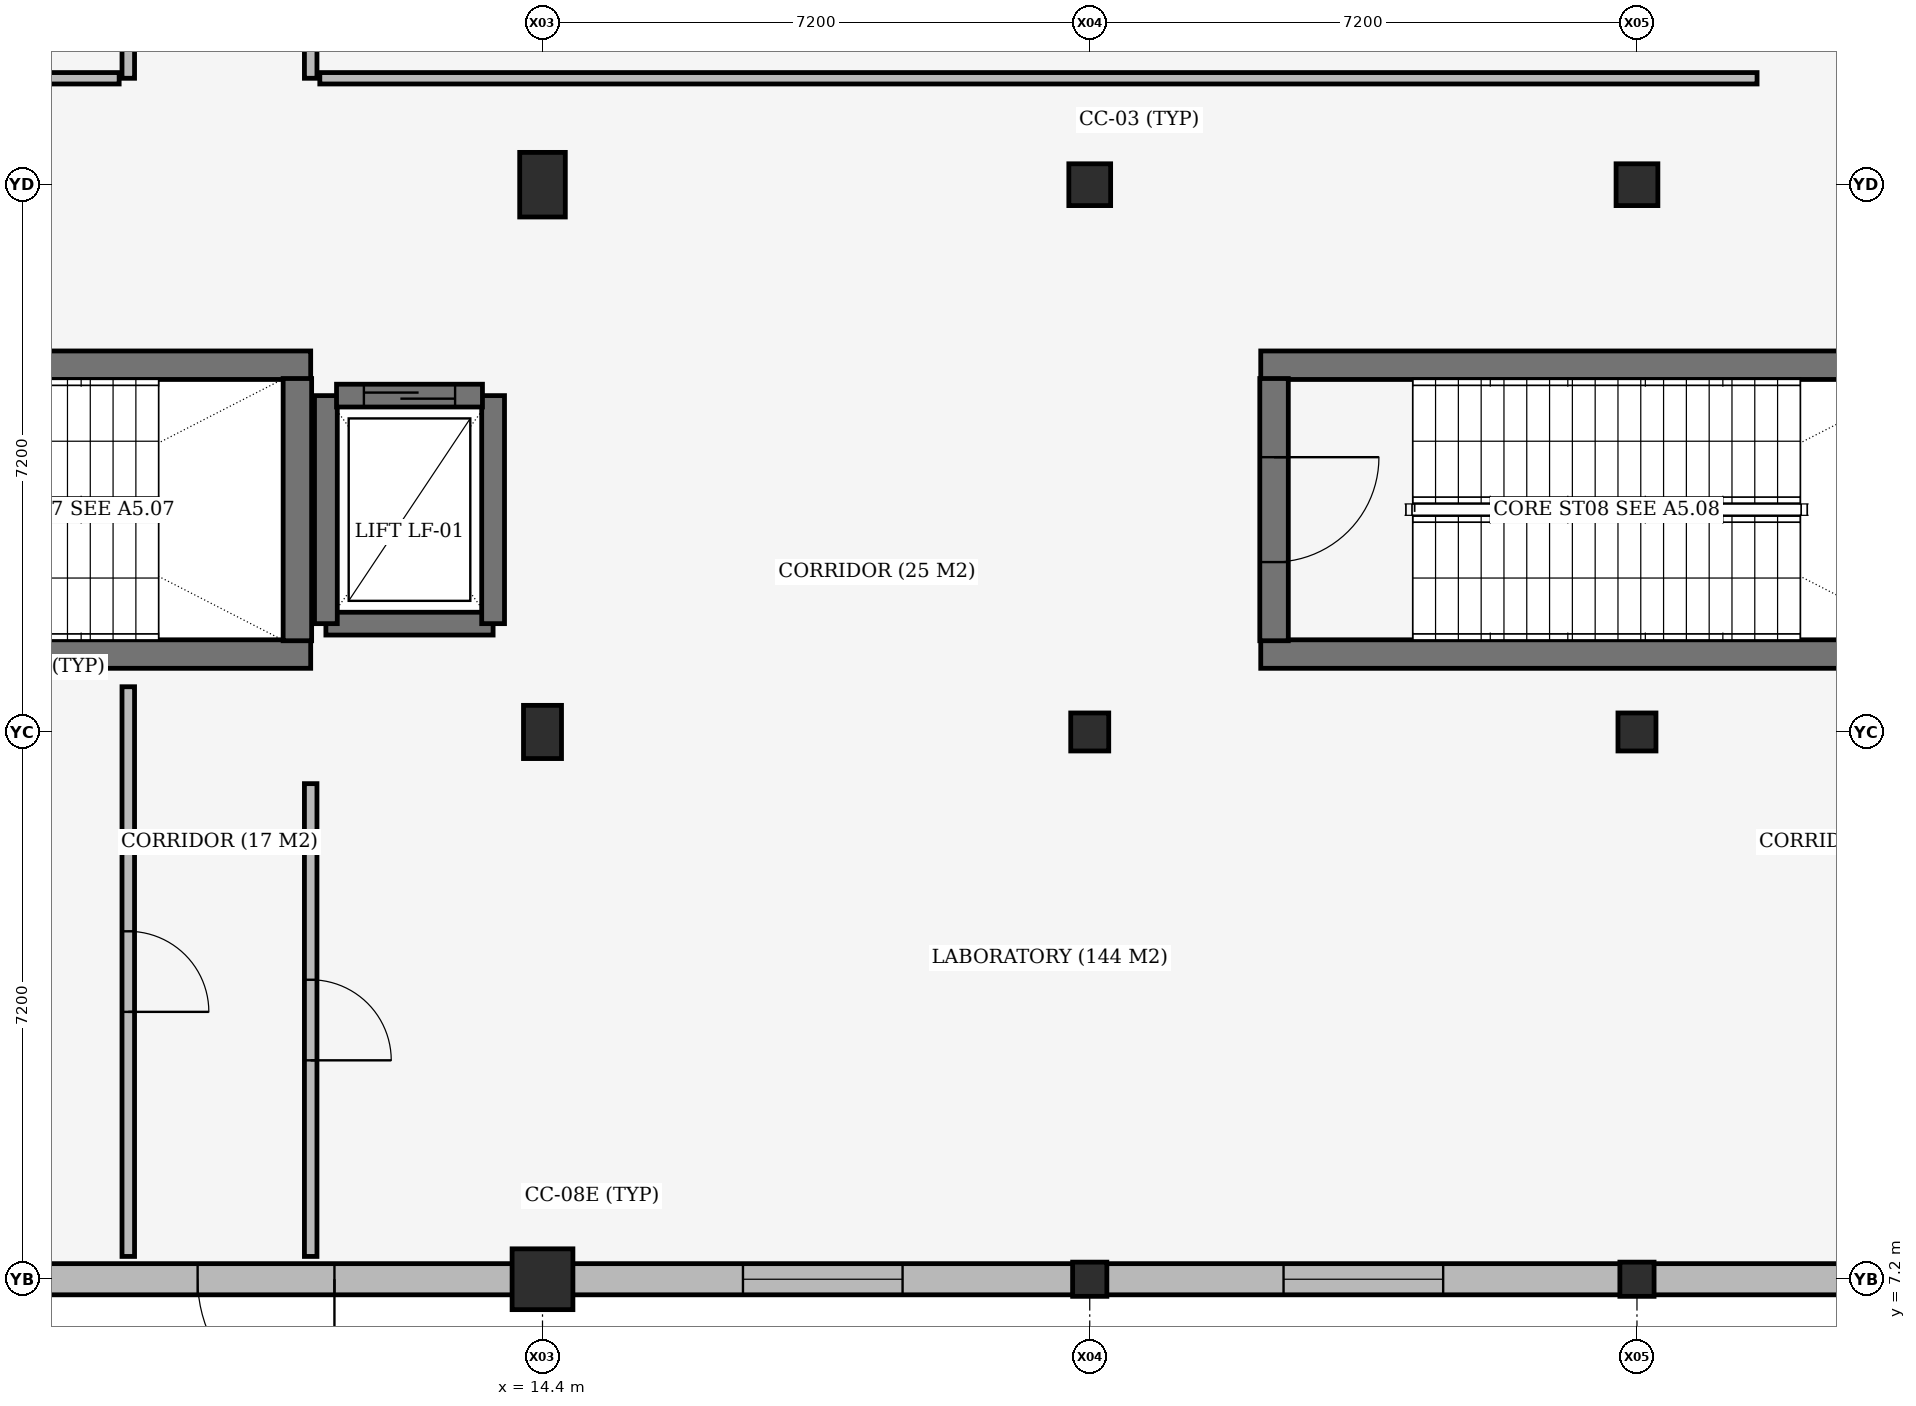
"""IFC4 building model, lengths in metres.
Left out: names, types, materials, properties, quantities, classifications, styles, units other than length and angle.
Written with IfcOpenShell. Run it as: python <this file> out.ifc"""

import sys

from ifc_helpers import new_model, si_unit, direction, frame, frame_2d, origin, origin_2d, place, context, subcontext, project, spatial, rectangle, extrude, element, fill, save


model = new_model("IFC4")
c1 = context("Model", 3, precision=1e-05, world=origin(), true_north=direction((0.0, 1.0)))
c2 = subcontext(c1, "Body", "Model", "MODEL_VIEW")
j1 = project(units=[si_unit("LENGTHUNIT", "METRE"), si_unit("PLANEANGLEUNIT", "RADIAN")], contexts=[c1])
p1 = place(None, origin())
s1 = spatial("IfcSite", under=j1, at=p1, CompositionType="ELEMENT")
p2 = place(p1, origin())
s2 = spatial("IfcBuilding", under=s1, at=p2, CompositionType="ELEMENT")
p3 = place(p2, origin())
s3 = spatial("IfcBuildingStorey", under=s2, at=p3, CompositionType="ELEMENT", Elevation=0.0)
p4 = place(p3, frame((14.4, 7.2, 0.0), z_axis=(0.0, 0.0, 1.0), x_axis=(1.0, 0.0, 0.0)))
e1 = element("IfcColumn", 1, at=p4, inside=s3, PredefinedType="COLUMN", context=c2, shape_type="SweptSolid", body=[
    extrude(rectangle(XDim=0.8, YDim=0.8, at=origin_2d()), origin(), (0.0, 0.0, 1.0), 5.1),
])
p5 = place(p3, frame((14.4, 14.4, 0.0), z_axis=(0.0, 0.0, 1.0), x_axis=(1.0, 0.0, 0.0)))
e2 = element("IfcColumn", 2, at=p5, inside=s3, PredefinedType="COLUMN", context=c2, shape_type="SweptSolid", body=[
    extrude(rectangle(XDim=0.5, YDim=0.7, at=origin_2d()), origin(), (0.0, 0.0, 1.0), 5.1),
])
p6 = place(p3, frame((14.4, 21.6, 0.0), z_axis=(0.0, 0.0, 1.0), x_axis=(1.0, 0.0, 0.0)))
e3 = element("IfcColumn", 3, at=p6, inside=s3, PredefinedType="COLUMN", context=c2, shape_type="SweptSolid", body=[
    extrude(rectangle(XDim=0.6, YDim=0.85, at=origin_2d()), origin(), (0.0, 0.0, 1.0), 5.1),
])
p7 = place(p3, frame((21.6, 7.2, 0.0), z_axis=(0.0, 0.0, 1.0), x_axis=(1.0, 0.0, 0.0)))
e4 = element("IfcColumn", 4, at=p7, inside=s3, PredefinedType="COLUMN", context=c2, shape_type="SweptSolid", body=[
    extrude(rectangle(XDim=0.45, YDim=0.45, at=origin_2d()), origin(), (0.0, 0.0, 1.0), 5.1),
])
p8 = place(p3, frame((21.6, 14.4, 0.0), z_axis=(0.0, 0.0, 1.0), x_axis=(1.0, 0.0, 0.0)))
e5 = element("IfcColumn", 5, at=p8, inside=s3, PredefinedType="COLUMN", context=c2, shape_type="SweptSolid", body=[
    extrude(rectangle(XDim=0.5, YDim=0.5, at=origin_2d()), origin(), (0.0, 0.0, 1.0), 5.1),
])
p9 = place(p3, frame((21.6, 21.6, 0.0), z_axis=(0.0, 0.0, 1.0), x_axis=(1.0, 0.0, 0.0)))
e6 = element("IfcColumn", 6, at=p9, inside=s3, PredefinedType="COLUMN", context=c2, shape_type="SweptSolid", body=[
    extrude(rectangle(XDim=0.55, YDim=0.55, at=origin_2d()), origin(), (0.0, 0.0, 1.0), 5.1),
])
p10 = place(p3, frame((28.8, 7.2, 0.0), z_axis=(0.0, 0.0, 1.0), x_axis=(1.0, 0.0, 0.0)))
e7 = element("IfcColumn", 7, at=p10, inside=s3, PredefinedType="COLUMN", context=c2, shape_type="SweptSolid", body=[
    extrude(rectangle(XDim=0.45, YDim=0.45, at=origin_2d()), origin(), (0.0, 0.0, 1.0), 5.1),
])
p11 = place(p3, frame((28.8, 14.4, 0.0), z_axis=(0.0, 0.0, 1.0), x_axis=(1.0, 0.0, 0.0)))
e8 = element("IfcColumn", 8, at=p11, inside=s3, PredefinedType="COLUMN", context=c2, shape_type="SweptSolid", body=[
    extrude(rectangle(XDim=0.5, YDim=0.5, at=origin_2d()), origin(), (0.0, 0.0, 1.0), 5.1),
])
p12 = place(p3, frame((28.8, 21.6, 0.0), z_axis=(0.0, 0.0, 1.0), x_axis=(1.0, 0.0, 0.0)))
e9 = element("IfcColumn", 9, at=p12, inside=s3, PredefinedType="COLUMN", context=c2, shape_type="SweptSolid", body=[
    extrude(rectangle(XDim=0.55, YDim=0.55, at=origin_2d()), origin(), (0.0, 0.0, 1.0), 5.1),
])
for number, where, z_axis, x_axis in (
    (10, (2.25, 15.425, 0.0), (0.0, 0.0, 1.0), (1.0, 0.0, 0.0)),
    (11, (11.35, 19.225, 0.0), (0.0, 0.0, 1.0), (-1.0, 0.0, 0.0)),
):
    element("IfcWall", number, at=place(p3, frame(where, z_axis=z_axis, x_axis=x_axis)), inside=s3, PredefinedType="SHEAR", context=c2, shape_type="SweptSolid", body=[
        extrude(rectangle(XDim=9.1, YDim=0.375, at=frame_2d((4.55, 0.0))), origin(), (0.0, 0.0, 1.0), 5.1),
    ])
p13 = place(p3, frame((11.175, 15.6, 0.0), z_axis=(0.0, 0.0, 1.0), x_axis=(0.0, 1.0, 0.0)))
e12 = element("IfcWall", 12, at=p13, inside=s3, PredefinedType="SHEAR", context=c2, shape_type="SweptSolid", body=[
    extrude(rectangle(XDim=3.45, YDim=0.375, at=frame_2d((1.725, 0.0))), origin(), (0.0, 0.0, 1.0), 5.1),
])
for number, where, z_axis, x_axis in (
    (13, (23.85, 15.425, 0.0), (0.0, 0.0, 1.0), (1.0, 0.0, 0.0)),
    (14, (32.95, 19.225, 0.0), (0.0, 0.0, 1.0), (-1.0, 0.0, 0.0)),
):
    element("IfcWall", number, at=place(p3, frame(where, z_axis=z_axis, x_axis=x_axis)), inside=s3, PredefinedType="SHEAR", context=c2, shape_type="SweptSolid", body=[
        extrude(rectangle(XDim=9.1, YDim=0.375, at=frame_2d((4.55, 0.0))), origin(), (0.0, 0.0, 1.0), 5.1),
    ])
p14 = place(p3, frame((11.55, 15.825, 0.0), z_axis=(0.0, 0.0, 1.0), x_axis=(1.0, 0.0, 0.0)))
e15 = element("IfcWall", 15, at=p14, inside=s3, PredefinedType="SHEAR", context=c2, shape_type="SweptSolid", body=[
    extrude(rectangle(XDim=2.2, YDim=0.3, at=frame_2d((1.1, 0.0))), origin(), (0.0, 0.0, 1.0), 5.1),
])
for number, where, z_axis, x_axis in (
    (16, (11.55, 18.825, 0.0), (0.0, 0.0, 1.0), (0.0, -1.0, 0.0)),
    (17, (13.75, 15.825, 0.0), (0.0, 0.0, 1.0), (0.0, 1.0, 0.0)),
):
    element("IfcWall", number, at=place(p3, frame(where, z_axis=z_axis, x_axis=x_axis)), inside=s3, PredefinedType="SHEAR", context=c2, shape_type="SweptSolid", body=[
        extrude(rectangle(XDim=3.0, YDim=0.3, at=frame_2d((1.5, 0.0))), origin(), (0.0, 0.0, 1.0), 5.1),
    ])
p15 = place(p3, frame((14.008, 7.2, 0.0), z_axis=(0.0, 0.0, 1.0), x_axis=(-1.0, 0.0, 0.0)))
e18 = element("IfcWall", 18, at=p15, inside=s3, PredefinedType="STANDARD", context=c2, shape_type="SweptSolid", body=[
    extrude(rectangle(XDim=6.491, YDim=0.41, at=frame_2d((3.246, 0.0))), origin(), (0.0, 0.0, 1.0), 4.3),
])
p16 = place(p15, frame((2.345, 0.0, 0.0)))
e19 = element("IfcOpeningElement", 19, at=p16, cuts=e18, PredefinedType="OPENING", context=c2, shape_type="SweptSolid", body=[
    extrude(rectangle(XDim=1.8, YDim=2.2, at=frame_2d((0.9, 1.1))), frame((0.0, 0.215, 0.0), z_axis=(0.0, -1.0, 0.0), x_axis=(1.0, 0.0, 0.0)), (0.0, 0.0, 1.0), 0.43),
])
p17 = place(p3, frame((21.383, 7.2, 0.0), z_axis=(0.0, 0.0, 1.0), x_axis=(-1.0, 0.0, 0.0)))
e20 = element("IfcWall", 20, at=p17, inside=s3, PredefinedType="STANDARD", context=c2, shape_type="SweptSolid", body=[
    extrude(rectangle(XDim=6.591, YDim=0.41, at=frame_2d((3.295, 0.0))), origin(), (0.0, 0.0, 1.0), 4.5),
])
p18 = place(p17, frame((2.246, 0.0, 0.8)))
e21 = element("IfcOpeningElement", 21, at=p18, cuts=e20, PredefinedType="OPENING", context=c2, shape_type="SweptSolid", body=[
    extrude(rectangle(XDim=2.1, YDim=3.0, at=frame_2d((1.05, 1.5))), frame((0.0, 0.215, 0.0), z_axis=(0.0, -1.0, 0.0), x_axis=(1.0, 0.0, 0.0)), (0.0, 0.0, 1.0), 0.43),
])
p19 = place(p3, frame((28.583, 7.2, 0.0), z_axis=(0.0, 0.0, 1.0), x_axis=(-1.0, 0.0, 0.0)))
e22 = element("IfcWall", 22, at=p19, inside=s3, PredefinedType="STANDARD", context=c2, shape_type="SweptSolid", body=[
    extrude(rectangle(XDim=6.766, YDim=0.41, at=frame_2d((3.383, 0.0))), origin(), (0.0, 0.0, 1.0), 4.35),
])
p20 = place(p19, frame((2.333, 0.0, 0.8)))
e23 = element("IfcOpeningElement", 23, at=p20, cuts=e22, PredefinedType="OPENING", context=c2, shape_type="SweptSolid", body=[
    extrude(rectangle(XDim=2.1, YDim=3.0, at=frame_2d((1.05, 1.5))), frame((0.0, 0.215, 0.0), z_axis=(0.0, -1.0, 0.0), x_axis=(1.0, 0.0, 0.0)), (0.0, 0.0, 1.0), 0.43),
])
p21 = place(p3, frame((35.708, 7.2, 0.0), z_axis=(0.0, 0.0, 1.0), x_axis=(-1.0, 0.0, 0.0)))
e24 = element("IfcWall", 24, at=p21, inside=s3, PredefinedType="STANDARD", context=c2, shape_type="SweptSolid", body=[
    extrude(rectangle(XDim=6.691, YDim=0.41, at=frame_2d((3.345, 0.0))), origin(), (0.0, 0.0, 1.0), 4.35),
])
p22 = place(p21, frame((2.446, 0.0, 0.0)))
e25 = element("IfcOpeningElement", 25, at=p22, cuts=e24, PredefinedType="OPENING", context=c2, shape_type="SweptSolid", body=[
    extrude(rectangle(XDim=1.8, YDim=2.2, at=frame_2d((0.9, 1.1))), frame((0.0, 0.215, 0.0), z_axis=(0.0, -1.0, 0.0), x_axis=(1.0, 0.0, 0.0)), (0.0, 0.0, 1.0), 0.43),
])
p23 = place(p3, frame((24.025, 19.05, 0.0), z_axis=(0.0, 0.0, 1.0), x_axis=(0.0, -1.0, 0.0)))
e26 = element("IfcWall", 26, at=p23, inside=s3, PredefinedType="SHEAR", context=c2, shape_type="SweptSolid", body=[
    extrude(rectangle(XDim=3.45, YDim=0.375, at=frame_2d((1.725, 0.0))), origin(), (0.0, 0.0, 1.0), 5.1),
])
p24 = place(p23, frame((1.035, 0.0, 0.0)))
e27 = element("IfcOpeningElement", 27, at=p24, cuts=e26, PredefinedType="OPENING", context=c2, shape_type="SweptSolid", body=[
    extrude(rectangle(XDim=1.38, YDim=2.2, at=frame_2d((0.69, 1.1))), frame((0.0, 0.198, 0.0), z_axis=(0.0, -1.0, 0.0), x_axis=(1.0, 0.0, 0.0)), (0.0, 0.0, 1.0), 0.395),
])
p25 = place(p3, frame((11.69, 18.825, 0.0), z_axis=(0.0, 0.0, 1.0), x_axis=(1.0, 0.0, 0.0)))
e28 = element("IfcWall", 28, at=p25, inside=s3, PredefinedType="SHEAR", context=c2, shape_type="SweptSolid", body=[
    extrude(rectangle(XDim=1.92, YDim=0.3, at=frame_2d((0.96, 0.0))), origin(), (0.0, 0.0, 1.0), 5.1),
])
p26 = place(p25, frame((0.36, 0.0, 0.0)))
e29 = element("IfcOpeningElement", 29, at=p26, cuts=e28, PredefinedType="OPENING", context=c2, shape_type="SweptSolid", body=[
    extrude(rectangle(XDim=1.2, YDim=2.1, at=frame_2d((0.6, 1.05))), frame((0.0, 0.16, 0.0), z_axis=(0.0, -1.0, 0.0), x_axis=(1.0, 0.0, 0.0)), (0.0, 0.0, 1.0), 0.32),
])
p27 = place(p3, frame((8.95, 7.5, 0.0), z_axis=(0.0, 0.0, 1.0), x_axis=(0.0, 1.0, 0.0)))
e30 = element("IfcWall", 30, at=p27, inside=s3, PredefinedType="PARTITIONING", context=c2, shape_type="SweptSolid", body=[
    extrude(rectangle(XDim=7.495, YDim=0.165, at=frame_2d((3.748, 0.0))), origin(), (0.0, 0.0, 1.0), 4.5),
])
p28 = place(p27, frame((3.218, 0.0, 0.0)))
e31 = element("IfcOpeningElement", 31, at=p28, cuts=e30, PredefinedType="OPENING", context=c2, shape_type="SweptSolid", body=[
    extrude(rectangle(XDim=1.06, YDim=2.2, at=frame_2d((0.53, 1.1))), frame((0.0, 0.093, 0.0), z_axis=(0.0, -1.0, 0.0), x_axis=(1.0, 0.0, 0.0)), (0.0, 0.0, 1.0), 0.185),
])
p29 = place(p3, frame((0.25, 23.0, 0.0), z_axis=(0.0, 0.0, 1.0), x_axis=(1.0, 0.0, 0.0)))
e32 = element("IfcWall", 32, at=p29, inside=s3, PredefinedType="PARTITIONING", context=c2, shape_type="SweptSolid", body=[
    extrude(rectangle(XDim=8.58, YDim=0.15, at=frame_2d((4.29, 0.0))), origin(), (0.0, 0.0, 1.0), 4.35),
])
p30 = place(p3, frame((8.95, 23.0, 0.0), z_axis=(0.0, 0.0, 1.0), x_axis=(0.0, 1.0, 0.0)))
e33 = element("IfcWall", 33, at=p30, inside=s3, PredefinedType="PARTITIONING", context=c2, shape_type="SweptSolid", body=[
    extrude(rectangle(XDim=10.195, YDim=0.165, at=frame_2d((5.098, 0.0))), origin(), (0.0, 0.0, 1.0), 4.4),
])
p31 = place(p30, frame((4.573, 0.0, 0.0)))
e34 = element("IfcOpeningElement", 34, at=p31, cuts=e33, PredefinedType="OPENING", context=c2, shape_type="SweptSolid", body=[
    extrude(rectangle(XDim=1.05, YDim=2.2, at=frame_2d((0.525, 1.1))), frame((0.0, 0.093, 0.0), z_axis=(0.0, -1.0, 0.0), x_axis=(1.0, 0.0, 0.0)), (0.0, 0.0, 1.0), 0.185),
])
p32 = place(p3, frame((11.35, 7.5, 0.0), z_axis=(0.0, 0.0, 1.0), x_axis=(0.0, 1.0, 0.0)))
e35 = element("IfcWall", 35, at=p32, inside=s3, PredefinedType="PARTITIONING", context=c2, shape_type="SweptSolid", body=[
    extrude(rectangle(XDim=6.22, YDim=0.165, at=frame_2d((3.11, 0.0))), origin(), (0.0, 0.0, 1.0), 5.1),
])
p33 = place(p32, frame((2.58, 0.0, 0.0)))
e36 = element("IfcOpeningElement", 36, at=p33, cuts=e35, PredefinedType="OPENING", context=c2, shape_type="SweptSolid", body=[
    extrude(rectangle(XDim=1.06, YDim=2.2, at=frame_2d((0.53, 1.1))), frame((0.0, 0.093, 0.0), z_axis=(0.0, -1.0, 0.0), x_axis=(1.0, 0.0, 0.0)), (0.0, 0.0, 1.0), 0.185),
])
p34 = place(p3, frame((11.35, 23.0, 0.0), z_axis=(0.0, 0.0, 1.0), x_axis=(0.0, 1.0, 0.0)))
e37 = element("IfcWall", 37, at=p34, inside=s3, PredefinedType="PARTITIONING", context=c2, shape_type="SweptSolid", body=[
    extrude(rectangle(XDim=18.6, YDim=0.165, at=frame_2d((9.3, 0.0))), origin(), (0.0, 0.0, 1.0), 4.35),
])
p35 = place(p34, frame((8.775, 0.0, 0.0)))
e38 = element("IfcOpeningElement", 38, at=p35, cuts=e37, PredefinedType="OPENING", context=c2, shape_type="SweptSolid", body=[
    extrude(rectangle(XDim=1.05, YDim=2.2, at=frame_2d((0.525, 1.1))), frame((0.0, 0.093, 0.0), z_axis=(0.0, -1.0, 0.0), x_axis=(1.0, 0.0, 0.0)), (0.0, 0.0, 1.0), 0.185),
])
p36 = place(p3, frame((11.47, 23.0, 0.0), z_axis=(0.0, 0.0, 1.0), x_axis=(1.0, 0.0, 0.0)))
e39 = element("IfcWall", 39, at=p36, inside=s3, PredefinedType="PARTITIONING", context=c2, shape_type="SweptSolid", body=[
    extrude(rectangle(XDim=18.91, YDim=0.15, at=frame_2d((9.455, 0.0))), origin(), (0.0, 0.0, 1.0), 4.3),
])
p37 = place(p16, origin())
e40 = element("IfcDoor", 40, at=p37, inside=s3, OperationType="DOUBLE_DOOR_SINGLE_SWING", PredefinedType="DOOR", context=c2, shape_type="SweptSolid", body=[
    extrude(rectangle(XDim=1.8, YDim=2.2, at=frame_2d((0.9, 1.1))), frame((0.0, 0.025, 0.0), z_axis=(0.0, -1.0, 0.0), x_axis=(1.0, 0.0, 0.0)), (0.0, 0.0, 1.0), 0.05),
])
fill(e19, e40)
p38 = place(p18, origin())
e41 = element("IfcWindow", 41, at=p38, inside=s3, PartitioningType="DOUBLE_PANEL_VERTICAL", PredefinedType="WINDOW", context=c2, shape_type="SweptSolid", body=[
    extrude(rectangle(XDim=2.1, YDim=3.0, at=frame_2d((1.05, 1.5))), frame((0.0, 0.03, 0.0), z_axis=(0.0, -1.0, 0.0), x_axis=(1.0, 0.0, 0.0)), (0.0, 0.0, 1.0), 0.06),
])
fill(e21, e41)
p39 = place(p20, origin())
e42 = element("IfcWindow", 42, at=p39, inside=s3, PartitioningType="DOUBLE_PANEL_VERTICAL", PredefinedType="WINDOW", context=c2, shape_type="SweptSolid", body=[
    extrude(rectangle(XDim=2.1, YDim=3.0, at=frame_2d((1.05, 1.5))), frame((0.0, 0.03, 0.0), z_axis=(0.0, -1.0, 0.0), x_axis=(1.0, 0.0, 0.0)), (0.0, 0.0, 1.0), 0.06),
])
fill(e23, e42)
p40 = place(p24, origin())
e43 = element("IfcDoor", 43, at=p40, inside=s3, OperationType="DOUBLE_DOOR_SINGLE_SWING", PredefinedType="DOOR", context=c2, shape_type="SweptSolid", body=[
    extrude(rectangle(XDim=1.38, YDim=2.2, at=frame_2d((0.69, 1.1))), frame((0.0, 0.025, 0.0), z_axis=(0.0, -1.0, 0.0), x_axis=(1.0, 0.0, 0.0)), (0.0, 0.0, 1.0), 0.05),
])
fill(e27, e43)
p41 = place(p26, origin())
e44 = element("IfcDoor", 44, at=p41, inside=s3, OperationType="SLIDING_TO_LEFT", PredefinedType="DOOR", context=c2, shape_type="SweptSolid", body=[
    extrude(rectangle(XDim=1.2, YDim=2.1, at=frame_2d((0.6, 1.05))), frame((0.0, 0.025, 0.0), z_axis=(0.0, -1.0, 0.0), x_axis=(1.0, 0.0, 0.0)), (0.0, 0.0, 1.0), 0.05),
])
fill(e29, e44)
p42 = place(p28, origin())
e45 = element("IfcDoor", 45, at=p42, inside=s3, OperationType="SINGLE_SWING_RIGHT", PredefinedType="DOOR", context=c2, shape_type="SweptSolid", body=[
    extrude(rectangle(XDim=1.06, YDim=2.2, at=frame_2d((0.53, 1.1))), frame((0.0, 0.025, 0.0), z_axis=(0.0, -1.0, 0.0), x_axis=(1.0, 0.0, 0.0)), (0.0, 0.0, 1.0), 0.05),
])
fill(e31, e45)
p43 = place(p33, origin())
e46 = element("IfcDoor", 46, at=p43, inside=s3, OperationType="SINGLE_SWING_RIGHT", PredefinedType="DOOR", context=c2, shape_type="SweptSolid", body=[
    extrude(rectangle(XDim=1.06, YDim=2.2, at=frame_2d((0.53, 1.1))), frame((0.0, 0.025, 0.0), z_axis=(0.0, -1.0, 0.0), x_axis=(1.0, 0.0, 0.0)), (0.0, 0.0, 1.0), 0.05),
])
fill(e36, e46)
save(model, sys.argv[1])
